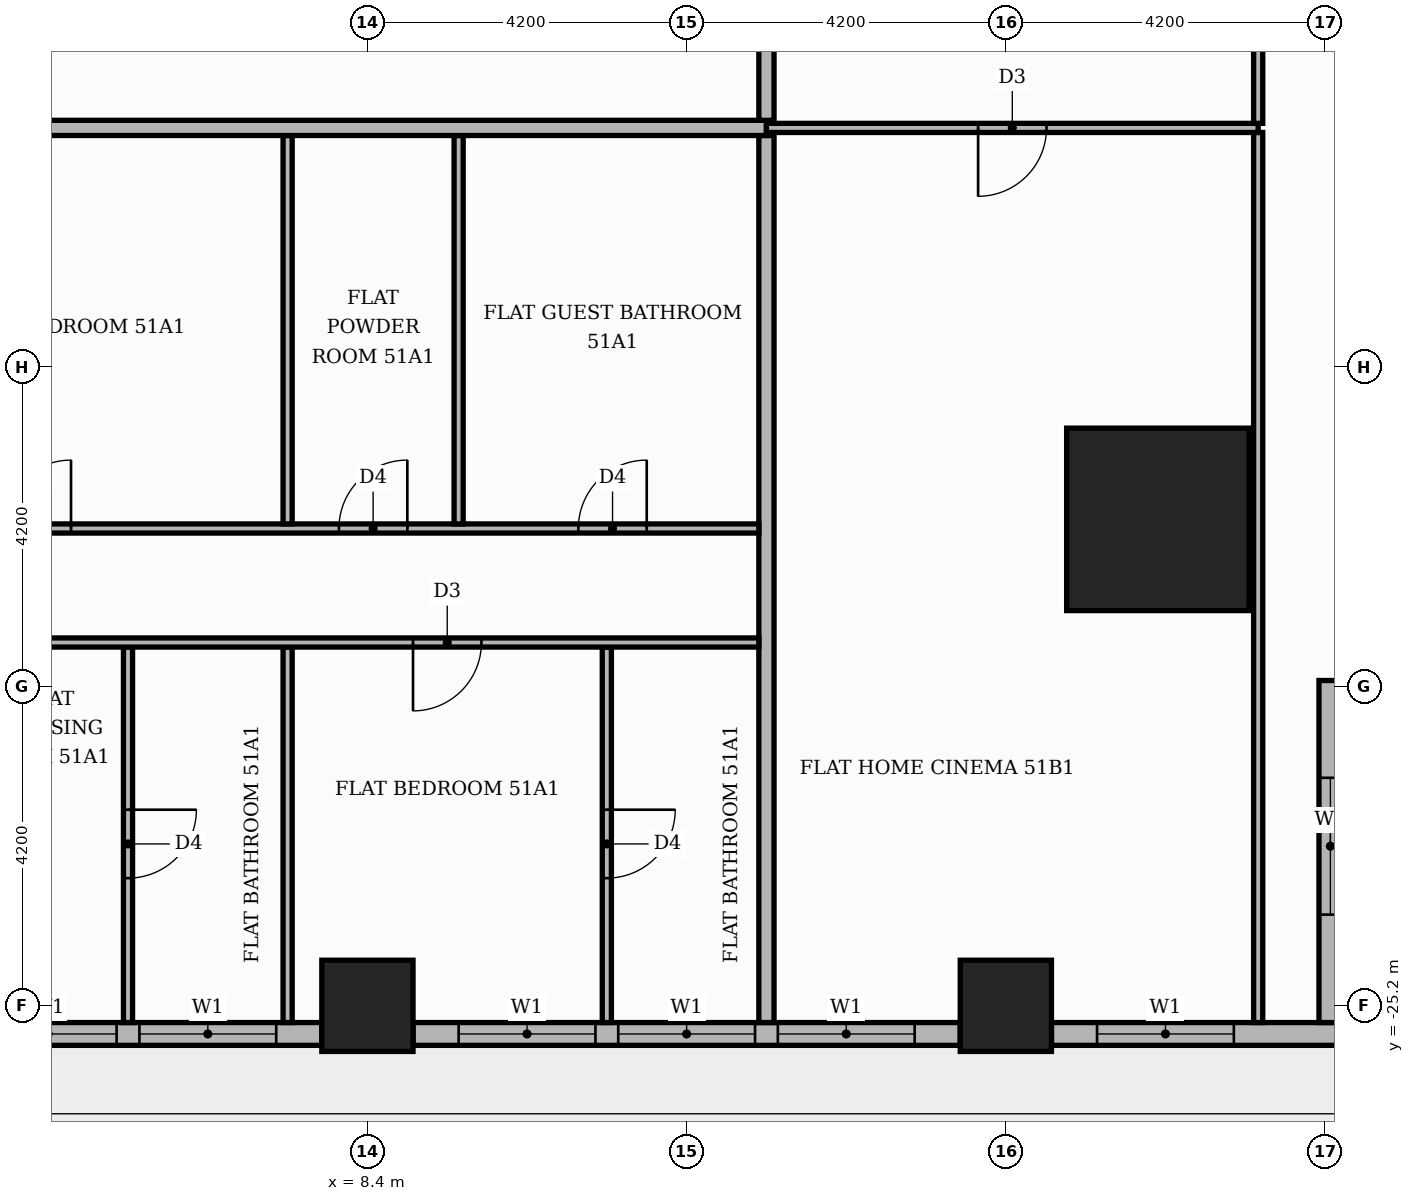
"""IFC4 building model, lengths in metres.
Left out: names, types, materials, properties, quantities, classifications, styles, units other than length and angle.
Written with IfcOpenShell. Run it as: python <this file> out.ifc"""

import sys

from ifc_helpers import new_model, si_unit, direction, frame, frame_2d, origin, origin_2d, place, context, subcontext, project, spatial, rectangle, extrude, element, fill, save


model = new_model("IFC4")
c1 = context("Model", 3, precision=1e-05, world=origin(), true_north=direction((0.0, 1.0)))
c2 = subcontext(c1, "Body", "Model", "MODEL_VIEW")
j1 = project(units=[si_unit("LENGTHUNIT", "METRE"), si_unit("PLANEANGLEUNIT", "RADIAN")], contexts=[c1])
p1 = place(None, origin())
s1 = spatial("IfcSite", under=j1, at=p1, CompositionType="ELEMENT")
p2 = place(p1, origin())
s2 = spatial("IfcBuilding", under=s1, at=p2, CompositionType="ELEMENT")
p3 = place(p2, frame((0.0, 0.0, 215.7)))
s3 = spatial("IfcBuildingStorey", under=s2, at=p3, CompositionType="ELEMENT", Elevation=215.7)
p4 = place(p3, frame((18.8, -18.8, 0.0), z_axis=(0.0, 0.0, 1.0), x_axis=(1.0, 0.0, 0.0)))
e1 = element("IfcColumn", 1, at=p4, inside=s3, PredefinedType="COLUMN", context=c2, shape_type="SweptSolid", body=[
    extrude(rectangle(XDim=2.4, YDim=2.4, at=origin_2d()), origin(), (0.0, 0.0, 1.0), 3.9),
])
for number, where, z_axis, x_axis in (
    (2, (8.4, -25.2, 0.0), (0.0, 0.0, 1.0), (1.0, 0.0, 0.0)),
    (3, (16.8, -25.2, 0.0), (0.0, 0.0, 1.0), (1.0, 0.0, 0.0)),
):
    element("IfcColumn", number, at=place(p3, frame(where, z_axis=z_axis, x_axis=x_axis)), inside=s3, PredefinedType="COLUMN", context=c2, shape_type="SweptSolid", body=[
        extrude(rectangle(XDim=1.2, YDim=1.2, at=origin_2d()), origin(), (0.0, 0.0, 1.0), 3.9),
    ])
p5 = place(p3, frame((0.6, -25.57, 0.0), z_axis=(0.0, 0.0, 1.0), x_axis=(1.0, 0.0, 0.0)))
e4 = element("IfcWall", 4, at=p5, inside=s3, PredefinedType="STANDARD", context=c2, shape_type="SweptSolid", body=[
    extrude(rectangle(XDim=7.2, YDim=0.3, at=frame_2d((3.6, 0.0))), origin(), (0.0, 0.0, 1.0), 3.48),
])
p6 = place(p5, frame((0.6, 0.0, 0.0)))
e5 = element("IfcOpeningElement", 5, at=p6, cuts=e4, PredefinedType="OPENING", context=c2, shape_type="SweptSolid", body=[
    extrude(rectangle(XDim=1.8, YDim=2.4, at=frame_2d((0.9, 1.2))), frame((0.0, 0.16, 0.0), z_axis=(0.0, -1.0, 0.0), x_axis=(1.0, 0.0, 0.0)), (0.0, 0.0, 1.0), 0.32),
])
p7 = place(p5, frame((2.7, 0.0, 0.9)))
e6 = element("IfcOpeningElement", 6, at=p7, cuts=e4, PredefinedType="OPENING", context=c2, shape_type="SweptSolid", body=[
    extrude(rectangle(XDim=1.8, YDim=2.1, at=frame_2d((0.9, 1.05))), frame((0.0, 0.16, 0.0), z_axis=(0.0, -1.0, 0.0), x_axis=(1.0, 0.0, 0.0)), (0.0, 0.0, 1.0), 0.32),
])
p8 = place(p5, frame((4.8, 0.0, 0.9)))
e7 = element("IfcOpeningElement", 7, at=p8, cuts=e4, PredefinedType="OPENING", context=c2, shape_type="SweptSolid", body=[
    extrude(rectangle(XDim=1.8, YDim=2.1, at=frame_2d((0.9, 1.05))), frame((0.0, 0.16, 0.0), z_axis=(0.0, -1.0, 0.0), x_axis=(1.0, 0.0, 0.0)), (0.0, 0.0, 1.0), 0.32),
])
p9 = place(p3, frame((9.0, -25.57, 0.0), z_axis=(0.0, 0.0, 1.0), x_axis=(1.0, 0.0, 0.0)))
e8 = element("IfcWall", 8, at=p9, inside=s3, PredefinedType="STANDARD", context=c2, shape_type="SweptSolid", body=[
    extrude(rectangle(XDim=7.2, YDim=0.3, at=frame_2d((3.6, 0.0))), origin(), (0.0, 0.0, 1.0), 3.48),
])
p10 = place(p9, frame((0.6, 0.0, 0.9)))
e9 = element("IfcOpeningElement", 9, at=p10, cuts=e8, PredefinedType="OPENING", context=c2, shape_type="SweptSolid", body=[
    extrude(rectangle(XDim=1.8, YDim=2.1, at=frame_2d((0.9, 1.05))), frame((0.0, 0.16, 0.0), z_axis=(0.0, -1.0, 0.0), x_axis=(1.0, 0.0, 0.0)), (0.0, 0.0, 1.0), 0.32),
])
p11 = place(p9, frame((2.7, 0.0, 0.9)))
e10 = element("IfcOpeningElement", 10, at=p11, cuts=e8, PredefinedType="OPENING", context=c2, shape_type="SweptSolid", body=[
    extrude(rectangle(XDim=1.8, YDim=2.1, at=frame_2d((0.9, 1.05))), frame((0.0, 0.16, 0.0), z_axis=(0.0, -1.0, 0.0), x_axis=(1.0, 0.0, 0.0)), (0.0, 0.0, 1.0), 0.32),
])
p12 = place(p9, frame((4.8, 0.0, 0.9)))
e11 = element("IfcOpeningElement", 11, at=p12, cuts=e8, PredefinedType="OPENING", context=c2, shape_type="SweptSolid", body=[
    extrude(rectangle(XDim=1.8, YDim=2.1, at=frame_2d((0.9, 1.05))), frame((0.0, 0.16, 0.0), z_axis=(0.0, -1.0, 0.0), x_axis=(1.0, 0.0, 0.0)), (0.0, 0.0, 1.0), 0.32),
])
p13 = place(p3, frame((17.4, -25.57, 0.0), z_axis=(0.0, 0.0, 1.0), x_axis=(1.0, 0.0, 0.0)))
e12 = element("IfcWall", 12, at=p13, inside=s3, PredefinedType="STANDARD", context=c2, shape_type="SweptSolid", body=[
    extrude(rectangle(XDim=3.82, YDim=0.3, at=frame_2d((1.91, 0.0))), origin(), (0.0, 0.0, 1.0), 3.48),
])
p14 = place(p13, frame((0.6, 0.0, 0.9)))
e13 = element("IfcOpeningElement", 13, at=p14, cuts=e12, PredefinedType="OPENING", context=c2, shape_type="SweptSolid", body=[
    extrude(rectangle(XDim=1.8, YDim=2.1, at=frame_2d((0.9, 1.05))), frame((0.0, 0.16, 0.0), z_axis=(0.0, -1.0, 0.0), x_axis=(1.0, 0.0, 0.0)), (0.0, 0.0, 1.0), 0.32),
])
p15 = place(p3, frame((21.07, -25.42, 0.0), z_axis=(0.0, 0.0, 1.0), x_axis=(0.0, 1.0, 0.0)))
e14 = element("IfcWall", 14, at=p15, inside=s3, PredefinedType="STANDARD", context=c2, shape_type="SweptSolid", body=[
    extrude(rectangle(XDim=4.5, YDim=0.3, at=frame_2d((2.25, 0.0))), origin(), (0.0, 0.0, 1.0), 3.48),
])
p16 = place(p15, frame((1.42, 0.0, 0.9)))
e15 = element("IfcOpeningElement", 15, at=p16, cuts=e14, PredefinedType="OPENING", context=c2, shape_type="SweptSolid", body=[
    extrude(rectangle(XDim=1.8, YDim=2.1, at=frame_2d((0.9, 1.05))), frame((0.0, 0.16, 0.0), z_axis=(0.0, -1.0, 0.0), x_axis=(1.0, 0.0, 0.0)), (0.0, 0.0, 1.0), 0.32),
])
p17 = place(p3, frame((5.25, -25.42, 0.0), z_axis=(0.0, 0.0, 1.0), x_axis=(0.0, 1.0, 0.0)))
e16 = element("IfcWall", 16, at=p17, inside=s3, PredefinedType="PARTITIONING", context=c2, shape_type="SweptSolid", body=[
    extrude(rectangle(XDim=4.94, YDim=0.12, at=frame_2d((2.47, 0.0))), origin(), (0.0, 0.0, 1.0), 3.48),
])
p18 = place(p17, frame((1.9, 0.0, 0.0)))
e17 = element("IfcOpeningElement", 17, at=p18, cuts=e16, PredefinedType="OPENING", context=c2, shape_type="SweptSolid", body=[
    extrude(rectangle(XDim=0.9, YDim=2.1, at=frame_2d((0.45, 1.05))), frame((0.0, 0.07, 0.0), z_axis=(0.0, -1.0, 0.0), x_axis=(1.0, 0.0, 0.0)), (0.0, 0.0, 1.0), 0.14),
])
p19 = place(p3, frame((7.35, -25.42, 0.0), z_axis=(0.0, 0.0, 1.0), x_axis=(0.0, 1.0, 0.0)))
e18 = element("IfcWall", 18, at=p19, inside=s3, PredefinedType="PARTITIONING", context=c2, shape_type="SweptSolid", body=[
    extrude(rectangle(XDim=4.94, YDim=0.12, at=frame_2d((2.47, 0.0))), origin(), (0.0, 0.0, 1.0), 3.48),
])
p20 = place(p3, frame((11.55, -25.42, 0.0), z_axis=(0.0, 0.0, 1.0), x_axis=(0.0, 1.0, 0.0)))
e19 = element("IfcWall", 19, at=p20, inside=s3, PredefinedType="PARTITIONING", context=c2, shape_type="SweptSolid", body=[
    extrude(rectangle(XDim=4.94, YDim=0.12, at=frame_2d((2.47, 0.0))), origin(), (0.0, 0.0, 1.0), 3.48),
])
p21 = place(p20, frame((1.9, 0.0, 0.0)))
e20 = element("IfcOpeningElement", 20, at=p21, cuts=e19, PredefinedType="OPENING", context=c2, shape_type="SweptSolid", body=[
    extrude(rectangle(XDim=0.9, YDim=2.1, at=frame_2d((0.45, 1.05))), frame((0.0, 0.07, 0.0), z_axis=(0.0, -1.0, 0.0), x_axis=(1.0, 0.0, 0.0)), (0.0, 0.0, 1.0), 0.14),
])
p22 = place(p3, frame((13.65, -25.42, 0.0), z_axis=(0.0, 0.0, 1.0), x_axis=(0.0, 1.0, 0.0)))
e21 = element("IfcWall", 21, at=p22, inside=s3, PredefinedType="PARTITIONING", context=c2, shape_type="SweptSolid", body=[
    extrude(rectangle(XDim=11.67, YDim=0.2, at=frame_2d((5.835, 0.0))), origin(), (0.0, 0.0, 1.0), 3.48),
])
p23 = place(p3, frame((20.12, -25.42, 0.0), z_axis=(0.0, 0.0, 1.0), x_axis=(0.0, 1.0, 0.0)))
e22 = element("IfcWall", 22, at=p23, inside=s3, PredefinedType="PARTITIONING", context=c2, shape_type="SweptSolid", body=[
    extrude(rectangle(XDim=11.71, YDim=0.12, at=frame_2d((5.855, 0.0))), origin(), (0.0, 0.0, 1.0), 3.48),
])
p24 = place(p3, frame((-21.219, -20.42, 0.0), z_axis=(0.0, 0.0, 1.0), x_axis=(1.0, 0.0, 0.0)))
e23 = element("IfcWall", 23, at=p24, inside=s3, PredefinedType="PARTITIONING", context=c2, shape_type="SweptSolid", body=[
    extrude(rectangle(XDim=34.769, YDim=0.12, at=frame_2d((17.385, 0.0))), origin(), (0.0, 0.0, 1.0), 3.48),
])
p25 = place(p24, frame((6.019, 0.0, 0.0)))
e24 = element("IfcOpeningElement", 24, at=p25, cuts=e23, PredefinedType="OPENING", context=c2, shape_type="SweptSolid", body=[
    extrude(rectangle(XDim=1.0, YDim=2.1, at=frame_2d((0.5, 1.05))), frame((0.0, 0.07, 0.0), z_axis=(0.0, -1.0, 0.0), x_axis=(1.0, 0.0, 0.0)), (0.0, 0.0, 1.0), 0.14),
])
p26 = place(p24, frame((11.269, 0.0, 0.0)))
e25 = element("IfcOpeningElement", 25, at=p26, cuts=e23, PredefinedType="OPENING", context=c2, shape_type="SweptSolid", body=[
    extrude(rectangle(XDim=1.0, YDim=2.1, at=frame_2d((0.5, 1.05))), frame((0.0, 0.07, 0.0), z_axis=(0.0, -1.0, 0.0), x_axis=(1.0, 0.0, 0.0)), (0.0, 0.0, 1.0), 0.14),
])
p27 = place(p24, frame((19.719, 0.0, 0.0)))
e26 = element("IfcOpeningElement", 26, at=p27, cuts=e23, PredefinedType="OPENING", context=c2, shape_type="SweptSolid", body=[
    extrude(rectangle(XDim=0.9, YDim=2.1, at=frame_2d((0.45, 1.05))), frame((0.0, 0.07, 0.0), z_axis=(0.0, -1.0, 0.0), x_axis=(1.0, 0.0, 0.0)), (0.0, 0.0, 1.0), 0.14),
])
p28 = place(p24, frame((30.219, 0.0, 0.0)))
e27 = element("IfcOpeningElement", 27, at=p28, cuts=e23, PredefinedType="OPENING", context=c2, shape_type="SweptSolid", body=[
    extrude(rectangle(XDim=0.9, YDim=2.1, at=frame_2d((0.45, 1.05))), frame((0.0, 0.07, 0.0), z_axis=(0.0, -1.0, 0.0), x_axis=(1.0, 0.0, 0.0)), (0.0, 0.0, 1.0), 0.14),
])
p29 = place(p3, frame((-9.45, -18.92, 0.0), z_axis=(0.0, 0.0, 1.0), x_axis=(1.0, 0.0, 0.0)))
e28 = element("IfcWall", 28, at=p29, inside=s3, PredefinedType="PARTITIONING", context=c2, shape_type="SweptSolid", body=[
    extrude(rectangle(XDim=23.0, YDim=0.12, at=frame_2d((11.5, 0.0))), origin(), (0.0, 0.0, 1.0), 3.48),
])
p30 = place(p29, frame((2.7, 0.0, 0.0)))
e29 = element("IfcOpeningElement", 29, at=p30, cuts=e28, PredefinedType="OPENING", context=c2, shape_type="SweptSolid", body=[
    extrude(rectangle(XDim=0.9, YDim=2.1, at=frame_2d((0.45, 1.05))), frame((0.0, 0.07, 0.0), z_axis=(0.0, -1.0, 0.0), x_axis=(1.0, 0.0, 0.0)), (0.0, 0.0, 1.0), 0.14),
])
p31 = place(p29, frame((7.8, 0.0, 0.0)))
e30 = element("IfcOpeningElement", 30, at=p31, cuts=e28, PredefinedType="OPENING", context=c2, shape_type="SweptSolid", body=[
    extrude(rectangle(XDim=0.9, YDim=2.1, at=frame_2d((0.45, 1.05))), frame((0.0, 0.07, 0.0), z_axis=(0.0, -1.0, 0.0), x_axis=(1.0, 0.0, 0.0)), (0.0, 0.0, 1.0), 0.14),
])
p32 = place(p29, frame((13.05, 0.0, 0.0)))
e31 = element("IfcOpeningElement", 31, at=p32, cuts=e28, PredefinedType="OPENING", context=c2, shape_type="SweptSolid", body=[
    extrude(rectangle(XDim=0.9, YDim=2.1, at=frame_2d((0.45, 1.05))), frame((0.0, 0.07, 0.0), z_axis=(0.0, -1.0, 0.0), x_axis=(1.0, 0.0, 0.0)), (0.0, 0.0, 1.0), 0.14),
])
p33 = place(p29, frame((17.475, 0.0, 0.0)))
e32 = element("IfcOpeningElement", 32, at=p33, cuts=e28, PredefinedType="OPENING", context=c2, shape_type="SweptSolid", body=[
    extrude(rectangle(XDim=0.9, YDim=2.1, at=frame_2d((0.45, 1.05))), frame((0.0, 0.07, 0.0), z_axis=(0.0, -1.0, 0.0), x_axis=(1.0, 0.0, 0.0)), (0.0, 0.0, 1.0), 0.14),
])
p34 = place(p29, frame((20.625, 0.0, 0.0)))
e33 = element("IfcOpeningElement", 33, at=p34, cuts=e28, PredefinedType="OPENING", context=c2, shape_type="SweptSolid", body=[
    extrude(rectangle(XDim=0.9, YDim=2.1, at=frame_2d((0.45, 1.05))), frame((0.0, 0.07, 0.0), z_axis=(0.0, -1.0, 0.0), x_axis=(1.0, 0.0, 0.0)), (0.0, 0.0, 1.0), 0.14),
])
for number, where, z_axis, x_axis in (
    (34, (7.35, -18.86, 0.0), (0.0, 0.0, 1.0), (0.0, 1.0, 0.0)),
    (35, (9.6, -18.86, 0.0), (0.0, 0.0, 1.0), (0.0, 1.0, 0.0)),
):
    element("IfcWall", number, at=place(p3, frame(where, z_axis=z_axis, x_axis=x_axis)), inside=s3, PredefinedType="PARTITIONING", context=c2, shape_type="SweptSolid", body=[
        extrude(rectangle(XDim=5.11, YDim=0.12, at=frame_2d((2.555, 0.0))), origin(), (0.0, 0.0, 1.0), 3.48),
    ])
p35 = place(p3, frame((-25.42, -13.65, 0.0), z_axis=(0.0, 0.0, 1.0), x_axis=(1.0, 0.0, 0.0)))
e36 = element("IfcWall", 36, at=p35, inside=s3, PredefinedType="PARTITIONING", context=c2, shape_type="SweptSolid", body=[
    extrude(rectangle(XDim=39.07, YDim=0.2, at=frame_2d((19.535, 0.0))), origin(), (0.0, 0.0, 1.0), 3.48),
])
p36 = place(p35, frame((13.32, 0.0, 0.0)))
e37 = element("IfcOpeningElement", 37, at=p36, cuts=e36, PredefinedType="OPENING", context=c2, shape_type="SweptSolid", body=[
    extrude(rectangle(XDim=1.1, YDim=2.4, at=frame_2d((0.55, 1.2))), frame((0.0, 0.11, 0.0), z_axis=(0.0, -1.0, 0.0), x_axis=(1.0, 0.0, 0.0)), (0.0, 0.0, 1.0), 0.22),
])
p37 = place(p3, frame((13.65, -13.65, 0.0), z_axis=(0.0, 0.0, 1.0), x_axis=(1.0, 0.0, 0.0)))
e38 = element("IfcWall", 38, at=p37, inside=s3, PredefinedType="PARTITIONING", context=c2, shape_type="SweptSolid", body=[
    extrude(rectangle(XDim=6.47, YDim=0.12, at=frame_2d((3.235, 0.0))), origin(), (0.0, 0.0, 1.0), 3.48),
])
p38 = place(p37, frame((2.785, 0.0, 0.0)))
e39 = element("IfcOpeningElement", 39, at=p38, cuts=e38, PredefinedType="OPENING", context=c2, shape_type="SweptSolid", body=[
    extrude(rectangle(XDim=0.9, YDim=2.1, at=frame_2d((0.45, 1.05))), frame((0.0, 0.07, 0.0), z_axis=(0.0, -1.0, 0.0), x_axis=(1.0, 0.0, 0.0)), (0.0, 0.0, 1.0), 0.14),
])
p39 = place(p3, frame((20.12, -13.59, 0.0), z_axis=(0.0, 0.0, 1.0), x_axis=(0.0, 1.0, 0.0)))
e40 = element("IfcWall", 40, at=p39, inside=s3, PredefinedType="PARTITIONING", context=c2, shape_type="SweptSolid", body=[
    extrude(rectangle(XDim=4.08, YDim=0.12, at=frame_2d((2.04, 0.0))), origin(), (0.0, 0.0, 1.0), 3.48),
])
p40 = place(p39, frame((1.54, 0.0, 0.0)))
e41 = element("IfcOpeningElement", 41, at=p40, cuts=e40, PredefinedType="OPENING", context=c2, shape_type="SweptSolid", body=[
    extrude(rectangle(XDim=1.0, YDim=2.1, at=frame_2d((0.5, 1.05))), frame((0.0, 0.07, 0.0), z_axis=(0.0, -1.0, 0.0), x_axis=(1.0, 0.0, 0.0)), (0.0, 0.0, 1.0), 0.14),
])
p41 = place(p3, frame((13.65, -13.55, 0.0), z_axis=(0.0, 0.0, 1.0), x_axis=(0.0, 1.0, 0.0)))
e42 = element("IfcWall", 42, at=p41, inside=s3, PredefinedType="PARTITIONING", context=c2, shape_type="SweptSolid", body=[
    extrude(rectangle(XDim=2.45, YDim=0.2, at=frame_2d((1.225, 0.0))), origin(), (0.0, 0.0, 1.0), 3.48),
])
p42 = place(p7, origin())
e43 = element("IfcWindow", 43, at=p42, inside=s3, PartitioningType="SINGLE_PANEL", PredefinedType="WINDOW", context=c2, shape_type="SweptSolid", body=[
    extrude(rectangle(XDim=1.8, YDim=2.1, at=frame_2d((0.9, 1.05))), frame((0.0, 0.03, 0.0), z_axis=(0.0, -1.0, 0.0), x_axis=(1.0, 0.0, 0.0)), (0.0, 0.0, 1.0), 0.06),
])
fill(e6, e43)
p43 = place(p8, origin())
e44 = element("IfcWindow", 44, at=p43, inside=s3, PartitioningType="SINGLE_PANEL", PredefinedType="WINDOW", context=c2, shape_type="SweptSolid", body=[
    extrude(rectangle(XDim=1.8, YDim=2.1, at=frame_2d((0.9, 1.05))), frame((0.0, 0.03, 0.0), z_axis=(0.0, -1.0, 0.0), x_axis=(1.0, 0.0, 0.0)), (0.0, 0.0, 1.0), 0.06),
])
fill(e7, e44)
p44 = place(p10, origin())
e45 = element("IfcWindow", 45, at=p44, inside=s3, PartitioningType="SINGLE_PANEL", PredefinedType="WINDOW", context=c2, shape_type="SweptSolid", body=[
    extrude(rectangle(XDim=1.8, YDim=2.1, at=frame_2d((0.9, 1.05))), frame((0.0, 0.03, 0.0), z_axis=(0.0, -1.0, 0.0), x_axis=(1.0, 0.0, 0.0)), (0.0, 0.0, 1.0), 0.06),
])
fill(e9, e45)
p45 = place(p11, origin())
e46 = element("IfcWindow", 46, at=p45, inside=s3, PartitioningType="SINGLE_PANEL", PredefinedType="WINDOW", context=c2, shape_type="SweptSolid", body=[
    extrude(rectangle(XDim=1.8, YDim=2.1, at=frame_2d((0.9, 1.05))), frame((0.0, 0.03, 0.0), z_axis=(0.0, -1.0, 0.0), x_axis=(1.0, 0.0, 0.0)), (0.0, 0.0, 1.0), 0.06),
])
fill(e10, e46)
p46 = place(p12, origin())
e47 = element("IfcWindow", 47, at=p46, inside=s3, PartitioningType="SINGLE_PANEL", PredefinedType="WINDOW", context=c2, shape_type="SweptSolid", body=[
    extrude(rectangle(XDim=1.8, YDim=2.1, at=frame_2d((0.9, 1.05))), frame((0.0, 0.03, 0.0), z_axis=(0.0, -1.0, 0.0), x_axis=(1.0, 0.0, 0.0)), (0.0, 0.0, 1.0), 0.06),
])
fill(e11, e47)
p47 = place(p14, origin())
e48 = element("IfcWindow", 48, at=p47, inside=s3, PartitioningType="SINGLE_PANEL", PredefinedType="WINDOW", context=c2, shape_type="SweptSolid", body=[
    extrude(rectangle(XDim=1.8, YDim=2.1, at=frame_2d((0.9, 1.05))), frame((0.0, 0.03, 0.0), z_axis=(0.0, -1.0, 0.0), x_axis=(1.0, 0.0, 0.0)), (0.0, 0.0, 1.0), 0.06),
])
fill(e13, e48)
p48 = place(p16, origin())
e49 = element("IfcWindow", 49, at=p48, inside=s3, PartitioningType="SINGLE_PANEL", PredefinedType="WINDOW", context=c2, shape_type="SweptSolid", body=[
    extrude(rectangle(XDim=1.8, YDim=2.1, at=frame_2d((0.9, 1.05))), frame((0.0, 0.03, 0.0), z_axis=(0.0, -1.0, 0.0), x_axis=(1.0, 0.0, 0.0)), (0.0, 0.0, 1.0), 0.06),
])
fill(e15, e49)
p49 = place(p32, origin())
e50 = element("IfcDoor", 50, at=p49, inside=s3, OperationType="SINGLE_SWING_RIGHT", PredefinedType="DOOR", context=c2, shape_type="SweptSolid", body=[
    extrude(rectangle(XDim=0.9, YDim=2.1, at=frame_2d((0.45, 1.05))), frame((0.0, 0.025, 0.0), z_axis=(0.0, -1.0, 0.0), x_axis=(1.0, 0.0, 0.0)), (0.0, 0.0, 1.0), 0.05),
])
fill(e31, e50)
p50 = place(p33, origin())
e51 = element("IfcDoor", 51, at=p50, inside=s3, OperationType="SINGLE_SWING_RIGHT", PredefinedType="DOOR", context=c2, shape_type="SweptSolid", body=[
    extrude(rectangle(XDim=0.9, YDim=2.1, at=frame_2d((0.45, 1.05))), frame((0.0, 0.025, 0.0), z_axis=(0.0, -1.0, 0.0), x_axis=(1.0, 0.0, 0.0)), (0.0, 0.0, 1.0), 0.05),
])
fill(e32, e51)
p51 = place(p34, origin())
e52 = element("IfcDoor", 52, at=p51, inside=s3, OperationType="SINGLE_SWING_RIGHT", PredefinedType="DOOR", context=c2, shape_type="SweptSolid", body=[
    extrude(rectangle(XDim=0.9, YDim=2.1, at=frame_2d((0.45, 1.05))), frame((0.0, 0.025, 0.0), z_axis=(0.0, -1.0, 0.0), x_axis=(1.0, 0.0, 0.0)), (0.0, 0.0, 1.0), 0.05),
])
fill(e33, e52)
p52 = place(p18, frame((0.9, 0.0, 0.0), z_axis=(0.0, 0.0, 1.0), x_axis=(-1.0, 0.0, 0.0)))
e53 = element("IfcDoor", 53, at=p52, inside=s3, OperationType="SINGLE_SWING_RIGHT", PredefinedType="DOOR", context=c2, shape_type="SweptSolid", body=[
    extrude(rectangle(XDim=0.9, YDim=2.1, at=frame_2d((0.45, 1.05))), frame((0.0, 0.025, 0.0), z_axis=(0.0, -1.0, 0.0), x_axis=(1.0, 0.0, 0.0)), (0.0, 0.0, 1.0), 0.05),
])
fill(e17, e53)
p53 = place(p28, frame((0.9, 0.0, 0.0), z_axis=(0.0, 0.0, 1.0), x_axis=(-1.0, 0.0, 0.0)))
e54 = element("IfcDoor", 54, at=p53, inside=s3, OperationType="SINGLE_SWING_LEFT", PredefinedType="DOOR", context=c2, shape_type="SweptSolid", body=[
    extrude(rectangle(XDim=0.9, YDim=2.1, at=frame_2d((0.45, 1.05))), frame((0.0, 0.025, 0.0), z_axis=(0.0, -1.0, 0.0), x_axis=(1.0, 0.0, 0.0)), (0.0, 0.0, 1.0), 0.05),
])
fill(e27, e54)
p54 = place(p21, frame((0.9, 0.0, 0.0), z_axis=(0.0, 0.0, 1.0), x_axis=(-1.0, 0.0, 0.0)))
e55 = element("IfcDoor", 55, at=p54, inside=s3, OperationType="SINGLE_SWING_RIGHT", PredefinedType="DOOR", context=c2, shape_type="SweptSolid", body=[
    extrude(rectangle(XDim=0.9, YDim=2.1, at=frame_2d((0.45, 1.05))), frame((0.0, 0.025, 0.0), z_axis=(0.0, -1.0, 0.0), x_axis=(1.0, 0.0, 0.0)), (0.0, 0.0, 1.0), 0.05),
])
fill(e20, e55)
p55 = place(p38, frame((0.9, 0.0, 0.0), z_axis=(0.0, 0.0, 1.0), x_axis=(-1.0, 0.0, 0.0)))
e56 = element("IfcDoor", 56, at=p55, inside=s3, OperationType="SINGLE_SWING_LEFT", PredefinedType="DOOR", context=c2, shape_type="SweptSolid", body=[
    extrude(rectangle(XDim=0.9, YDim=2.1, at=frame_2d((0.45, 1.05))), frame((0.0, 0.025, 0.0), z_axis=(0.0, -1.0, 0.0), x_axis=(1.0, 0.0, 0.0)), (0.0, 0.0, 1.0), 0.05),
])
fill(e39, e56)
save(model, sys.argv[1])
